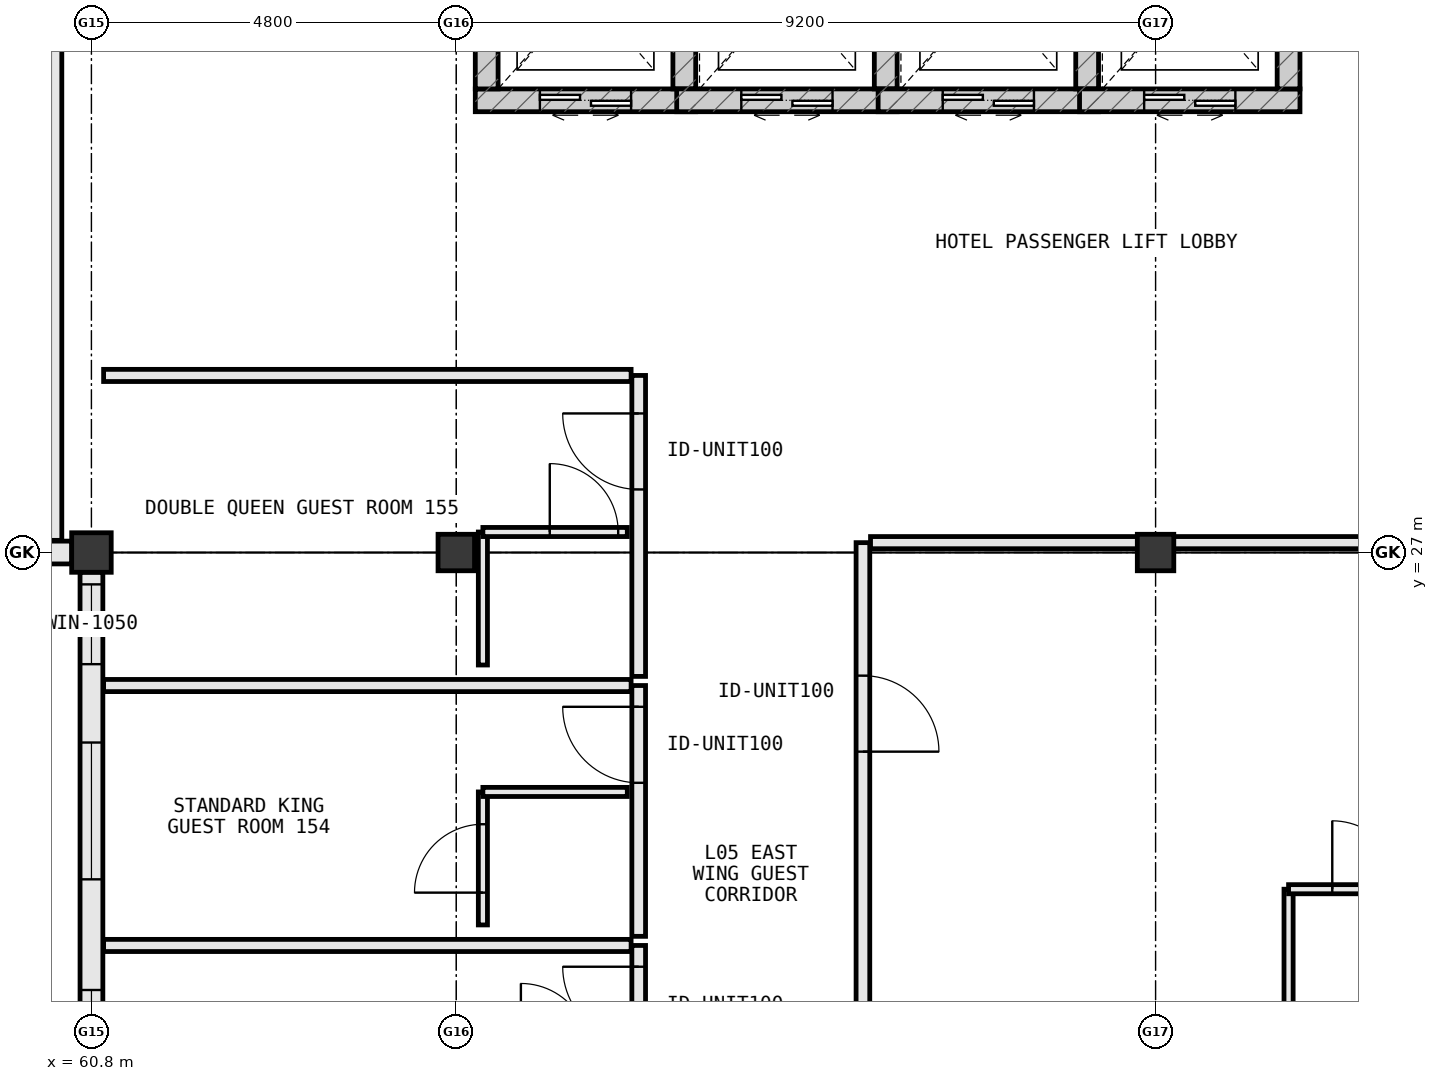
"""IFC4 building model, lengths in metres.
Left out: names, types, materials, properties, quantities, classifications, styles, units other than length and angle.
Written with IfcOpenShell. Run it as: python <this file> out.ifc"""

import sys

from ifc_helpers import new_model, si_unit, direction, frame, frame_2d, origin, origin_2d, place, context, subcontext, project, spatial, rectangle, extrude, element, fill, save


model = new_model("IFC4")
c1 = context("Model", 3, precision=1e-05, world=origin(), true_north=direction((0.0, 1.0)))
c2 = subcontext(c1, "Body", "Model", "MODEL_VIEW")
j1 = project(units=[si_unit("LENGTHUNIT", "METRE"), si_unit("PLANEANGLEUNIT", "RADIAN")], contexts=[c1])
p1 = place(None, origin())
s1 = spatial("IfcSite", under=j1, at=p1, CompositionType="ELEMENT")
p2 = place(p1, origin())
s2 = spatial("IfcBuilding", under=s1, at=p2, CompositionType="ELEMENT")
p3 = place(p2, frame((0.0, 0.0, 23.8)))
s3 = spatial("IfcBuildingStorey", under=s2, at=p3, CompositionType="ELEMENT", Elevation=23.8)
p4 = place(p3, frame((60.8, 27.0, 0.0), z_axis=(0.0, 0.0, 1.0), x_axis=(1.0, 0.0, 0.0)))
e1 = element("IfcColumn", 1, at=p4, inside=s3, PredefinedType="COLUMN", context=c2, shape_type="SweptSolid", body=[
    extrude(rectangle(XDim=0.52, YDim=0.52, at=origin_2d()), origin(), (0.0, 0.0, 1.0), 3.8),
])
for number, where, z_axis, x_axis in (
    (2, (74.8, 27.0, 0.0), (0.0, 0.0, 1.0), (1.0, 0.0, 0.0)),
    (3, (65.6, 27.0, 0.0), (0.0, 0.0, 1.0), (1.0, 0.0, 0.0)),
):
    element("IfcColumn", number, at=place(p3, frame(where, z_axis=z_axis, x_axis=x_axis)), inside=s3, PredefinedType="COLUMN", context=c2, shape_type="SweptSolid", body=[
        extrude(rectangle(XDim=0.48, YDim=0.48, at=origin_2d()), origin(), (0.0, 0.0, 1.0), 3.8),
    ])
p5 = place(p3, frame((51.423, 27.0, 0.0), z_axis=(0.0, 0.0, 1.0), x_axis=(1.0, 0.0, 0.0)))
e4 = element("IfcWall", 4, at=p5, inside=s3, PredefinedType="STANDARD", context=c2, shape_type="SweptSolid", body=[
    extrude(rectangle(XDim=9.119, YDim=0.3, at=frame_2d((4.56, 0.0))), origin(), (0.0, 0.0, 1.0), 2.785),
])
p6 = place(p5, frame((1.68, 0.0, 0.85)))
e5 = element("IfcOpeningElement", 5, at=p6, cuts=e4, PredefinedType="OPENING", context=c2, shape_type="SweptSolid", body=[
    extrude(rectangle(XDim=1.2, YDim=1.55, at=frame_2d((0.6, 0.775))), frame((0.0, 0.162, 0.0), z_axis=(0.0, -1.0, 0.0), x_axis=(1.0, 0.0, 0.0)), (0.0, 0.0, 1.0), 0.324),
])
p7 = place(p5, frame((6.239, 0.0, 0.85)))
e6 = element("IfcOpeningElement", 6, at=p7, cuts=e4, PredefinedType="OPENING", context=c2, shape_type="SweptSolid", body=[
    extrude(rectangle(XDim=1.2, YDim=1.55, at=frame_2d((0.6, 0.775))), frame((0.0, 0.162, 0.0), z_axis=(0.0, -1.0, 0.0), x_axis=(1.0, 0.0, 0.0)), (0.0, 0.0, 1.0), 0.324),
])
p8 = place(p3, frame((60.8, 26.742, 0.0), z_axis=(0.0, 0.0, 1.0), x_axis=(0.0, -1.0, 0.0)))
e7 = element("IfcWall", 7, at=p8, inside=s3, PredefinedType="STANDARD", context=c2, shape_type="SweptSolid", body=[
    extrude(rectangle(XDim=7.884, YDim=0.3, at=frame_2d((3.942, 0.0))), origin(), (0.0, 0.0, 1.0), 3.005),
])
p9 = place(p8, frame((5.498, 0.0, 0.85)))
e8 = element("IfcOpeningElement", 8, at=p9, cuts=e7, PredefinedType="OPENING", context=c2, shape_type="SweptSolid", body=[
    extrude(rectangle(XDim=1.8, YDim=1.85, at=frame_2d((0.9, 0.925))), frame((0.0, 0.162, 0.0), z_axis=(0.0, -1.0, 0.0), x_axis=(1.0, 0.0, 0.0)), (0.0, 0.0, 1.0), 0.324),
])
p10 = place(p8, frame((2.242, 0.0, 0.85)))
e9 = element("IfcOpeningElement", 9, at=p10, cuts=e7, PredefinedType="OPENING", context=c2, shape_type="SweptSolid", body=[
    extrude(rectangle(XDim=1.8, YDim=1.85, at=frame_2d((0.9, 0.925))), frame((0.0, 0.162, 0.0), z_axis=(0.0, -1.0, 0.0), x_axis=(1.0, 0.0, 0.0)), (0.0, 0.0, 1.0), 0.324),
])
p11 = place(p8, frame((0.161, 0.0, 0.85)))
e10 = element("IfcOpeningElement", 10, at=p11, cuts=e7, PredefinedType="OPENING", context=c2, shape_type="SweptSolid", body=[
    extrude(rectangle(XDim=1.05, YDim=1.45, at=frame_2d((0.525, 0.725))), frame((0.0, 0.162, 0.0), z_axis=(0.0, -1.0, 0.0), x_axis=(1.0, 0.0, 0.0)), (0.0, 0.0, 1.0), 0.324),
])
p12 = place(p3, frame((65.85, 32.95, 0.0), z_axis=(0.0, 0.0, 1.0), x_axis=(1.0, 0.0, 0.0)))
e11 = element("IfcWall", 11, at=p12, inside=s3, PredefinedType="SHEAR", context=c2, shape_type="SweptSolid", body=[
    extrude(rectangle(XDim=2.9, YDim=0.3, at=frame_2d((1.45, 0.0))), origin(), (0.0, 0.0, 1.0), 3.8),
])
p13 = place(p12, frame((0.85, 0.0, 0.0)))
e12 = element("IfcOpeningElement", 12, at=p13, cuts=e11, PredefinedType="OPENING", context=c2, shape_type="SweptSolid", body=[
    extrude(rectangle(XDim=1.2, YDim=2.2, at=frame_2d((0.6, 1.1))), frame((0.0, 0.162, 0.0), z_axis=(0.0, -1.0, 0.0), x_axis=(1.0, 0.0, 0.0)), (0.0, 0.0, 1.0), 0.324),
])
for number, where, z_axis, x_axis in (
    (13, (68.6, 33.1, 0.0), (0.0, 0.0, 1.0), (0.0, 1.0, 0.0)),
    (14, (66.0, 35.7, 0.0), (0.0, 0.0, 1.0), (0.0, -1.0, 0.0)),
):
    element("IfcWall", number, at=place(p3, frame(where, z_axis=z_axis, x_axis=x_axis)), inside=s3, PredefinedType="SHEAR", context=c2, shape_type="SweptSolid", body=[
        extrude(rectangle(XDim=2.6, YDim=0.3, at=frame_2d((1.3, 0.0))), origin(), (0.0, 0.0, 1.0), 3.8),
    ])
p14 = place(p3, frame((68.5, 32.95, 0.0), z_axis=(0.0, 0.0, 1.0), x_axis=(1.0, 0.0, 0.0)))
e15 = element("IfcWall", 15, at=p14, inside=s3, PredefinedType="SHEAR", context=c2, shape_type="SweptSolid", body=[
    extrude(rectangle(XDim=2.9, YDim=0.3, at=frame_2d((1.45, 0.0))), origin(), (0.0, 0.0, 1.0), 3.8),
])
p15 = place(p14, frame((0.85, 0.0, 0.0)))
e16 = element("IfcOpeningElement", 16, at=p15, cuts=e15, PredefinedType="OPENING", context=c2, shape_type="SweptSolid", body=[
    extrude(rectangle(XDim=1.2, YDim=2.2, at=frame_2d((0.6, 1.1))), frame((0.0, 0.162, 0.0), z_axis=(0.0, -1.0, 0.0), x_axis=(1.0, 0.0, 0.0)), (0.0, 0.0, 1.0), 0.324),
])
p16 = place(p3, frame((71.25, 33.1, 0.0), z_axis=(0.0, 0.0, 1.0), x_axis=(0.0, 1.0, 0.0)))
e17 = element("IfcWall", 17, at=p16, inside=s3, PredefinedType="SHEAR", context=c2, shape_type="SweptSolid", body=[
    extrude(rectangle(XDim=2.6, YDim=0.3, at=frame_2d((1.3, 0.0))), origin(), (0.0, 0.0, 1.0), 3.8),
])
p17 = place(p3, frame((71.15, 32.95, 0.0), z_axis=(0.0, 0.0, 1.0), x_axis=(1.0, 0.0, 0.0)))
e18 = element("IfcWall", 18, at=p17, inside=s3, PredefinedType="SHEAR", context=c2, shape_type="SweptSolid", body=[
    extrude(rectangle(XDim=2.9, YDim=0.3, at=frame_2d((1.45, 0.0))), origin(), (0.0, 0.0, 1.0), 3.8),
])
p18 = place(p17, frame((0.85, 0.0, 0.0)))
e19 = element("IfcOpeningElement", 19, at=p18, cuts=e18, PredefinedType="OPENING", context=c2, shape_type="SweptSolid", body=[
    extrude(rectangle(XDim=1.2, YDim=2.2, at=frame_2d((0.6, 1.1))), frame((0.0, 0.162, 0.0), z_axis=(0.0, -1.0, 0.0), x_axis=(1.0, 0.0, 0.0)), (0.0, 0.0, 1.0), 0.324),
])
p19 = place(p3, frame((73.9, 33.1, 0.0), z_axis=(0.0, 0.0, 1.0), x_axis=(0.0, 1.0, 0.0)))
e20 = element("IfcWall", 20, at=p19, inside=s3, PredefinedType="SHEAR", context=c2, shape_type="SweptSolid", body=[
    extrude(rectangle(XDim=2.6, YDim=0.3, at=frame_2d((1.3, 0.0))), origin(), (0.0, 0.0, 1.0), 3.8),
])
p20 = place(p3, frame((73.8, 32.95, 0.0), z_axis=(0.0, 0.0, 1.0), x_axis=(1.0, 0.0, 0.0)))
e21 = element("IfcWall", 21, at=p20, inside=s3, PredefinedType="SHEAR", context=c2, shape_type="SweptSolid", body=[
    extrude(rectangle(XDim=2.9, YDim=0.3, at=frame_2d((1.45, 0.0))), origin(), (0.0, 0.0, 1.0), 3.8),
])
p21 = place(p20, frame((0.85, 0.0, 0.0)))
e22 = element("IfcOpeningElement", 22, at=p21, cuts=e21, PredefinedType="OPENING", context=c2, shape_type="SweptSolid", body=[
    extrude(rectangle(XDim=1.2, YDim=2.2, at=frame_2d((0.6, 1.1))), frame((0.0, 0.162, 0.0), z_axis=(0.0, -1.0, 0.0), x_axis=(1.0, 0.0, 0.0)), (0.0, 0.0, 1.0), 0.324),
])
p22 = place(p3, frame((76.55, 33.1, 0.0), z_axis=(0.0, 0.0, 1.0), x_axis=(0.0, 1.0, 0.0)))
e23 = element("IfcWall", 23, at=p22, inside=s3, PredefinedType="SHEAR", context=c2, shape_type="SweptSolid", body=[
    extrude(rectangle(XDim=2.6, YDim=0.3, at=frame_2d((1.3, 0.0))), origin(), (0.0, 0.0, 1.0), 3.8),
])
p23 = place(p3, frame((68.0, 18.53, 0.0), z_axis=(0.0, 0.0, 1.0), x_axis=(0.0, 1.0, 0.0)))
e24 = element("IfcWall", 24, at=p23, inside=s3, PredefinedType="PARTITIONING", context=c2, shape_type="SweptSolid", body=[
    extrude(rectangle(XDim=3.3, YDim=0.18, at=frame_2d((1.65, 0.0))), origin(), (0.0, 0.0, 1.0), 3.55),
])
p24 = place(p23, frame((2.02, 0.0, 0.0)))
e25 = element("IfcOpeningElement", 25, at=p24, cuts=e24, PredefinedType="OPENING", context=c2, shape_type="SweptSolid", body=[
    extrude(rectangle(XDim=1.0, YDim=2.2, at=frame_2d((0.5, 1.1))), frame((0.0, 0.102, 0.0), z_axis=(0.0, -1.0, 0.0), x_axis=(1.0, 0.0, 0.0)), (0.0, 0.0, 1.0), 0.204),
])
p25 = place(p3, frame((60.96, 21.83, 0.0), z_axis=(0.0, 0.0, 1.0), x_axis=(1.0, 0.0, 0.0)))
e26 = element("IfcWall", 26, at=p25, inside=s3, PredefinedType="PARTITIONING", context=c2, shape_type="SweptSolid", body=[
    extrude(rectangle(XDim=6.94, YDim=0.16, at=frame_2d((3.47, 0.0))), origin(), (0.0, 0.0, 1.0), 3.55),
])
p26 = place(p3, frame((68.0, 21.95, 0.0), z_axis=(0.0, 0.0, 1.0), x_axis=(0.0, 1.0, 0.0)))
e27 = element("IfcWall", 27, at=p26, inside=s3, PredefinedType="PARTITIONING", context=c2, shape_type="SweptSolid", body=[
    extrude(rectangle(XDim=3.3, YDim=0.18, at=frame_2d((1.65, 0.0))), origin(), (0.0, 0.0, 1.0), 3.55),
])
p27 = place(p26, frame((2.02, 0.0, 0.0)))
e28 = element("IfcOpeningElement", 28, at=p27, cuts=e27, PredefinedType="OPENING", context=c2, shape_type="SweptSolid", body=[
    extrude(rectangle(XDim=1.0, YDim=2.2, at=frame_2d((0.5, 1.1))), frame((0.0, 0.102, 0.0), z_axis=(0.0, -1.0, 0.0), x_axis=(1.0, 0.0, 0.0)), (0.0, 0.0, 1.0), 0.204),
])
p28 = place(p3, frame((60.96, 25.25, 0.0), z_axis=(0.0, 0.0, 1.0), x_axis=(1.0, 0.0, 0.0)))
e29 = element("IfcWall", 29, at=p28, inside=s3, PredefinedType="PARTITIONING", context=c2, shape_type="SweptSolid", body=[
    extrude(rectangle(XDim=6.94, YDim=0.16, at=frame_2d((3.47, 0.0))), origin(), (0.0, 0.0, 1.0), 3.55),
])
p29 = place(p3, frame((65.95, 22.1, 0.0), z_axis=(0.0, 0.0, 1.0), x_axis=(0.0, 1.0, 0.0)))
e30 = element("IfcWall", 30, at=p29, inside=s3, PredefinedType="PARTITIONING", context=c2, shape_type="SweptSolid", body=[
    extrude(rectangle(XDim=1.75, YDim=0.12, at=frame_2d((0.875, 0.0))), origin(), (0.0, 0.0, 1.0), 3.005),
])
p30 = place(p29, frame((0.425, 0.0, 0.0)))
e31 = element("IfcOpeningElement", 31, at=p30, cuts=e30, PredefinedType="OPENING", context=c2, shape_type="SweptSolid", body=[
    extrude(rectangle(XDim=0.9, YDim=2.15, at=frame_2d((0.45, 1.075))), frame((0.0, 0.072, 0.0), z_axis=(0.0, -1.0, 0.0), x_axis=(1.0, 0.0, 0.0)), (0.0, 0.0, 1.0), 0.144),
])
p31 = place(p3, frame((65.95, 23.85, 0.0), z_axis=(0.0, 0.0, 1.0), x_axis=(1.0, 0.0, 0.0)))
e32 = element("IfcWall", 32, at=p31, inside=s3, PredefinedType="PARTITIONING", context=c2, shape_type="SweptSolid", body=[
    extrude(rectangle(XDim=1.9, YDim=0.12, at=frame_2d((0.95, 0.0))), origin(), (0.0, 0.0, 1.0), 3.55),
])
p32 = place(p3, frame((68.0, 25.37, 0.0), z_axis=(0.0, 0.0, 1.0), x_axis=(0.0, 1.0, 0.0)))
e33 = element("IfcWall", 33, at=p32, inside=s3, PredefinedType="PARTITIONING", context=c2, shape_type="SweptSolid", body=[
    extrude(rectangle(XDim=3.96, YDim=0.18, at=frame_2d((1.98, 0.0))), origin(), (0.0, 0.0, 1.0), 3.55),
])
p33 = place(p32, frame((2.46, 0.0, 0.0)))
e34 = element("IfcOpeningElement", 34, at=p33, cuts=e33, PredefinedType="OPENING", context=c2, shape_type="SweptSolid", body=[
    extrude(rectangle(XDim=1.0, YDim=2.2, at=frame_2d((0.5, 1.1))), frame((0.0, 0.102, 0.0), z_axis=(0.0, -1.0, 0.0), x_axis=(1.0, 0.0, 0.0)), (0.0, 0.0, 1.0), 0.204),
])
p34 = place(p3, frame((60.96, 29.33, 0.0), z_axis=(0.0, 0.0, 1.0), x_axis=(1.0, 0.0, 0.0)))
e35 = element("IfcWall", 35, at=p34, inside=s3, PredefinedType="PARTITIONING", context=c2, shape_type="SweptSolid", body=[
    extrude(rectangle(XDim=6.94, YDim=0.16, at=frame_2d((3.47, 0.0))), origin(), (0.0, 0.0, 1.0), 3.55),
])
p35 = place(p3, frame((65.95, 25.52, 0.0), z_axis=(0.0, 0.0, 1.0), x_axis=(0.0, 1.0, 0.0)))
e36 = element("IfcWall", 36, at=p35, inside=s3, PredefinedType="PARTITIONING", context=c2, shape_type="SweptSolid", body=[
    extrude(rectangle(XDim=1.75, YDim=0.12, at=frame_2d((0.875, 0.0))), origin(), (0.0, 0.0, 1.0), 3.005),
])
p36 = place(p3, frame((65.95, 27.27, 0.0), z_axis=(0.0, 0.0, 1.0), x_axis=(1.0, 0.0, 0.0)))
e37 = element("IfcWall", 37, at=p36, inside=s3, PredefinedType="PARTITIONING", context=c2, shape_type="SweptSolid", body=[
    extrude(rectangle(XDim=1.9, YDim=0.12, at=frame_2d((0.95, 0.0))), origin(), (0.0, 0.0, 1.0), 2.905),
])
p37 = place(p36, frame((0.88, 0.0, 0.0)))
e38 = element("IfcOpeningElement", 38, at=p37, cuts=e37, PredefinedType="OPENING", context=c2, shape_type="SweptSolid", body=[
    extrude(rectangle(XDim=0.9, YDim=2.15, at=frame_2d((0.45, 1.075))), frame((0.0, 0.072, 0.0), z_axis=(0.0, -1.0, 0.0), x_axis=(1.0, 0.0, 0.0)), (0.0, 0.0, 1.0), 0.144),
])
p38 = place(p3, frame((70.95, 27.13, 0.0), z_axis=(0.0, 0.0, 1.0), x_axis=(0.0, -1.0, 0.0)))
e39 = element("IfcWall", 39, at=p38, inside=s3, PredefinedType="PARTITIONING", context=c2, shape_type="SweptSolid", body=[
    extrude(rectangle(XDim=6.46, YDim=0.18, at=frame_2d((3.23, 0.0))), origin(), (0.0, 0.0, 1.0), 3.55),
])
p39 = place(p38, frame((1.75, 0.0, 0.0)))
e40 = element("IfcOpeningElement", 40, at=p39, cuts=e39, PredefinedType="OPENING", context=c2, shape_type="SweptSolid", body=[
    extrude(rectangle(XDim=1.0, YDim=2.2, at=frame_2d((0.5, 1.1))), frame((0.0, 0.102, 0.0), z_axis=(0.0, -1.0, 0.0), x_axis=(1.0, 0.0, 0.0)), (0.0, 0.0, 1.0), 0.204),
])
p40 = place(p3, frame((71.05, 27.13, 0.0), z_axis=(0.0, 0.0, 1.0), x_axis=(1.0, 0.0, 0.0)))
e41 = element("IfcWall", 41, at=p40, inside=s3, PredefinedType="PARTITIONING", context=c2, shape_type="SweptSolid", body=[
    extrude(rectangle(XDim=12.79, YDim=0.16, at=frame_2d((6.395, 0.0))), origin(), (0.0, 0.0, 1.0), 2.905),
])
p41 = place(p3, frame((76.55, 20.82, 0.0), z_axis=(0.0, 0.0, 1.0), x_axis=(0.0, 1.0, 0.0)))
e42 = element("IfcWall", 42, at=p41, inside=s3, PredefinedType="PARTITIONING", context=c2, shape_type="SweptSolid", body=[
    extrude(rectangle(XDim=1.75, YDim=0.12, at=frame_2d((0.875, 0.0))), origin(), (0.0, 0.0, 1.0), 3.55),
])
p42 = place(p3, frame((76.55, 22.57, 0.0), z_axis=(0.0, 0.0, 1.0), x_axis=(1.0, 0.0, 0.0)))
e43 = element("IfcWall", 43, at=p42, inside=s3, PredefinedType="PARTITIONING", context=c2, shape_type="SweptSolid", body=[
    extrude(rectangle(XDim=2.05, YDim=0.12, at=frame_2d((1.025, 0.0))), origin(), (0.0, 0.0, 1.0), 3.55),
])
p43 = place(p42, frame((0.575, 0.0, 0.0)))
e44 = element("IfcOpeningElement", 44, at=p43, cuts=e43, PredefinedType="OPENING", context=c2, shape_type="SweptSolid", body=[
    extrude(rectangle(XDim=0.9, YDim=2.15, at=frame_2d((0.45, 1.075))), frame((0.0, 0.072, 0.0), z_axis=(0.0, -1.0, 0.0), x_axis=(1.0, 0.0, 0.0)), (0.0, 0.0, 1.0), 0.144),
])
p44 = place(p3, frame((60.33, 27.16, 0.0), z_axis=(0.0, 0.0, 1.0), x_axis=(0.0, 1.0, 0.0)))
e45 = element("IfcWall", 45, at=p44, inside=s3, PredefinedType="PARTITIONING", context=c2, shape_type="SweptSolid", body=[
    extrude(rectangle(XDim=10.34, YDim=0.16, at=frame_2d((5.17, 0.0))), origin(), (0.0, 0.0, 1.0), 3.55),
])
p45 = place(p9, origin())
e46 = element("IfcWindow", 46, at=p45, inside=s3, PartitioningType="SINGLE_PANEL", PredefinedType="WINDOW", context=c2, shape_type="SweptSolid", body=[
    extrude(rectangle(XDim=1.8, YDim=1.85, at=frame_2d((0.9, 0.925))), frame((0.0, 0.03, 0.0), z_axis=(0.0, -1.0, 0.0), x_axis=(1.0, 0.0, 0.0)), (0.0, 0.0, 1.0), 0.06),
])
fill(e8, e46)
p46 = place(p10, origin())
e47 = element("IfcWindow", 47, at=p46, inside=s3, PartitioningType="SINGLE_PANEL", PredefinedType="WINDOW", context=c2, shape_type="SweptSolid", body=[
    extrude(rectangle(XDim=1.8, YDim=1.85, at=frame_2d((0.9, 0.925))), frame((0.0, 0.03, 0.0), z_axis=(0.0, -1.0, 0.0), x_axis=(1.0, 0.0, 0.0)), (0.0, 0.0, 1.0), 0.06),
])
fill(e9, e47)
p47 = place(p11, origin())
e48 = element("IfcWindow", 48, at=p47, inside=s3, PartitioningType="SINGLE_PANEL", PredefinedType="WINDOW", context=c2, shape_type="SweptSolid", body=[
    extrude(rectangle(XDim=1.05, YDim=1.45, at=frame_2d((0.525, 0.725))), frame((0.0, 0.03, 0.0), z_axis=(0.0, -1.0, 0.0), x_axis=(1.0, 0.0, 0.0)), (0.0, 0.0, 1.0), 0.06),
])
fill(e10, e48)
p48 = place(p13, origin())
e49 = element("IfcDoor", 49, at=p48, inside=s3, OperationType="DOUBLE_DOOR_SLIDING", PredefinedType="DOOR", context=c2, shape_type="SweptSolid", body=[
    extrude(rectangle(XDim=1.2, YDim=2.2, at=frame_2d((0.6, 1.1))), frame((0.0, 0.025, 0.0), z_axis=(0.0, -1.0, 0.0), x_axis=(1.0, 0.0, 0.0)), (0.0, 0.0, 1.0), 0.05),
])
fill(e12, e49)
p49 = place(p15, origin())
e50 = element("IfcDoor", 50, at=p49, inside=s3, OperationType="DOUBLE_DOOR_SLIDING", PredefinedType="DOOR", context=c2, shape_type="SweptSolid", body=[
    extrude(rectangle(XDim=1.2, YDim=2.2, at=frame_2d((0.6, 1.1))), frame((0.0, 0.025, 0.0), z_axis=(0.0, -1.0, 0.0), x_axis=(1.0, 0.0, 0.0)), (0.0, 0.0, 1.0), 0.05),
])
fill(e16, e50)
p50 = place(p18, origin())
e51 = element("IfcDoor", 51, at=p50, inside=s3, OperationType="DOUBLE_DOOR_SLIDING", PredefinedType="DOOR", context=c2, shape_type="SweptSolid", body=[
    extrude(rectangle(XDim=1.2, YDim=2.2, at=frame_2d((0.6, 1.1))), frame((0.0, 0.025, 0.0), z_axis=(0.0, -1.0, 0.0), x_axis=(1.0, 0.0, 0.0)), (0.0, 0.0, 1.0), 0.05),
])
fill(e19, e51)
p51 = place(p21, origin())
e52 = element("IfcDoor", 52, at=p51, inside=s3, OperationType="DOUBLE_DOOR_SLIDING", PredefinedType="DOOR", context=c2, shape_type="SweptSolid", body=[
    extrude(rectangle(XDim=1.2, YDim=2.2, at=frame_2d((0.6, 1.1))), frame((0.0, 0.025, 0.0), z_axis=(0.0, -1.0, 0.0), x_axis=(1.0, 0.0, 0.0)), (0.0, 0.0, 1.0), 0.05),
])
fill(e22, e52)
p52 = place(p24, origin())
e53 = element("IfcDoor", 53, at=p52, inside=s3, OperationType="SINGLE_SWING_RIGHT", PredefinedType="DOOR", context=c2, shape_type="SweptSolid", body=[
    extrude(rectangle(XDim=1.0, YDim=2.2, at=frame_2d((0.5, 1.1))), frame((0.0, 0.025, 0.0), z_axis=(0.0, -1.0, 0.0), x_axis=(1.0, 0.0, 0.0)), (0.0, 0.0, 1.0), 0.05),
])
fill(e25, e53)
p53 = place(p27, origin())
e54 = element("IfcDoor", 54, at=p53, inside=s3, OperationType="SINGLE_SWING_RIGHT", PredefinedType="DOOR", context=c2, shape_type="SweptSolid", body=[
    extrude(rectangle(XDim=1.0, YDim=2.2, at=frame_2d((0.5, 1.1))), frame((0.0, 0.025, 0.0), z_axis=(0.0, -1.0, 0.0), x_axis=(1.0, 0.0, 0.0)), (0.0, 0.0, 1.0), 0.05),
])
fill(e28, e54)
p54 = place(p30, origin())
e55 = element("IfcDoor", 55, at=p54, inside=s3, OperationType="SINGLE_SWING_LEFT", PredefinedType="DOOR", context=c2, shape_type="SweptSolid", body=[
    extrude(rectangle(XDim=0.9, YDim=2.15, at=frame_2d((0.45, 1.075))), frame((0.0, 0.025, 0.0), z_axis=(0.0, -1.0, 0.0), x_axis=(1.0, 0.0, 0.0)), (0.0, 0.0, 1.0), 0.05),
])
fill(e31, e55)
p55 = place(p33, origin())
e56 = element("IfcDoor", 56, at=p55, inside=s3, OperationType="SINGLE_SWING_RIGHT", PredefinedType="DOOR", context=c2, shape_type="SweptSolid", body=[
    extrude(rectangle(XDim=1.0, YDim=2.2, at=frame_2d((0.5, 1.1))), frame((0.0, 0.025, 0.0), z_axis=(0.0, -1.0, 0.0), x_axis=(1.0, 0.0, 0.0)), (0.0, 0.0, 1.0), 0.05),
])
fill(e34, e56)
p56 = place(p37, origin())
e57 = element("IfcDoor", 57, at=p56, inside=s3, OperationType="SINGLE_SWING_LEFT", PredefinedType="DOOR", context=c2, shape_type="SweptSolid", body=[
    extrude(rectangle(XDim=0.9, YDim=2.15, at=frame_2d((0.45, 1.075))), frame((0.0, 0.025, 0.0), z_axis=(0.0, -1.0, 0.0), x_axis=(1.0, 0.0, 0.0)), (0.0, 0.0, 1.0), 0.05),
])
fill(e38, e57)
p57 = place(p39, origin())
e58 = element("IfcDoor", 58, at=p57, inside=s3, OperationType="SINGLE_SWING_RIGHT", PredefinedType="DOOR", context=c2, shape_type="SweptSolid", body=[
    extrude(rectangle(XDim=1.0, YDim=2.2, at=frame_2d((0.5, 1.1))), frame((0.0, 0.025, 0.0), z_axis=(0.0, -1.0, 0.0), x_axis=(1.0, 0.0, 0.0)), (0.0, 0.0, 1.0), 0.05),
])
fill(e40, e58)
p58 = place(p43, origin())
e59 = element("IfcDoor", 59, at=p58, inside=s3, OperationType="SINGLE_SWING_LEFT", PredefinedType="DOOR", context=c2, shape_type="SweptSolid", body=[
    extrude(rectangle(XDim=0.9, YDim=2.15, at=frame_2d((0.45, 1.075))), frame((0.0, 0.025, 0.0), z_axis=(0.0, -1.0, 0.0), x_axis=(1.0, 0.0, 0.0)), (0.0, 0.0, 1.0), 0.05),
])
fill(e44, e59)
save(model, sys.argv[1])
